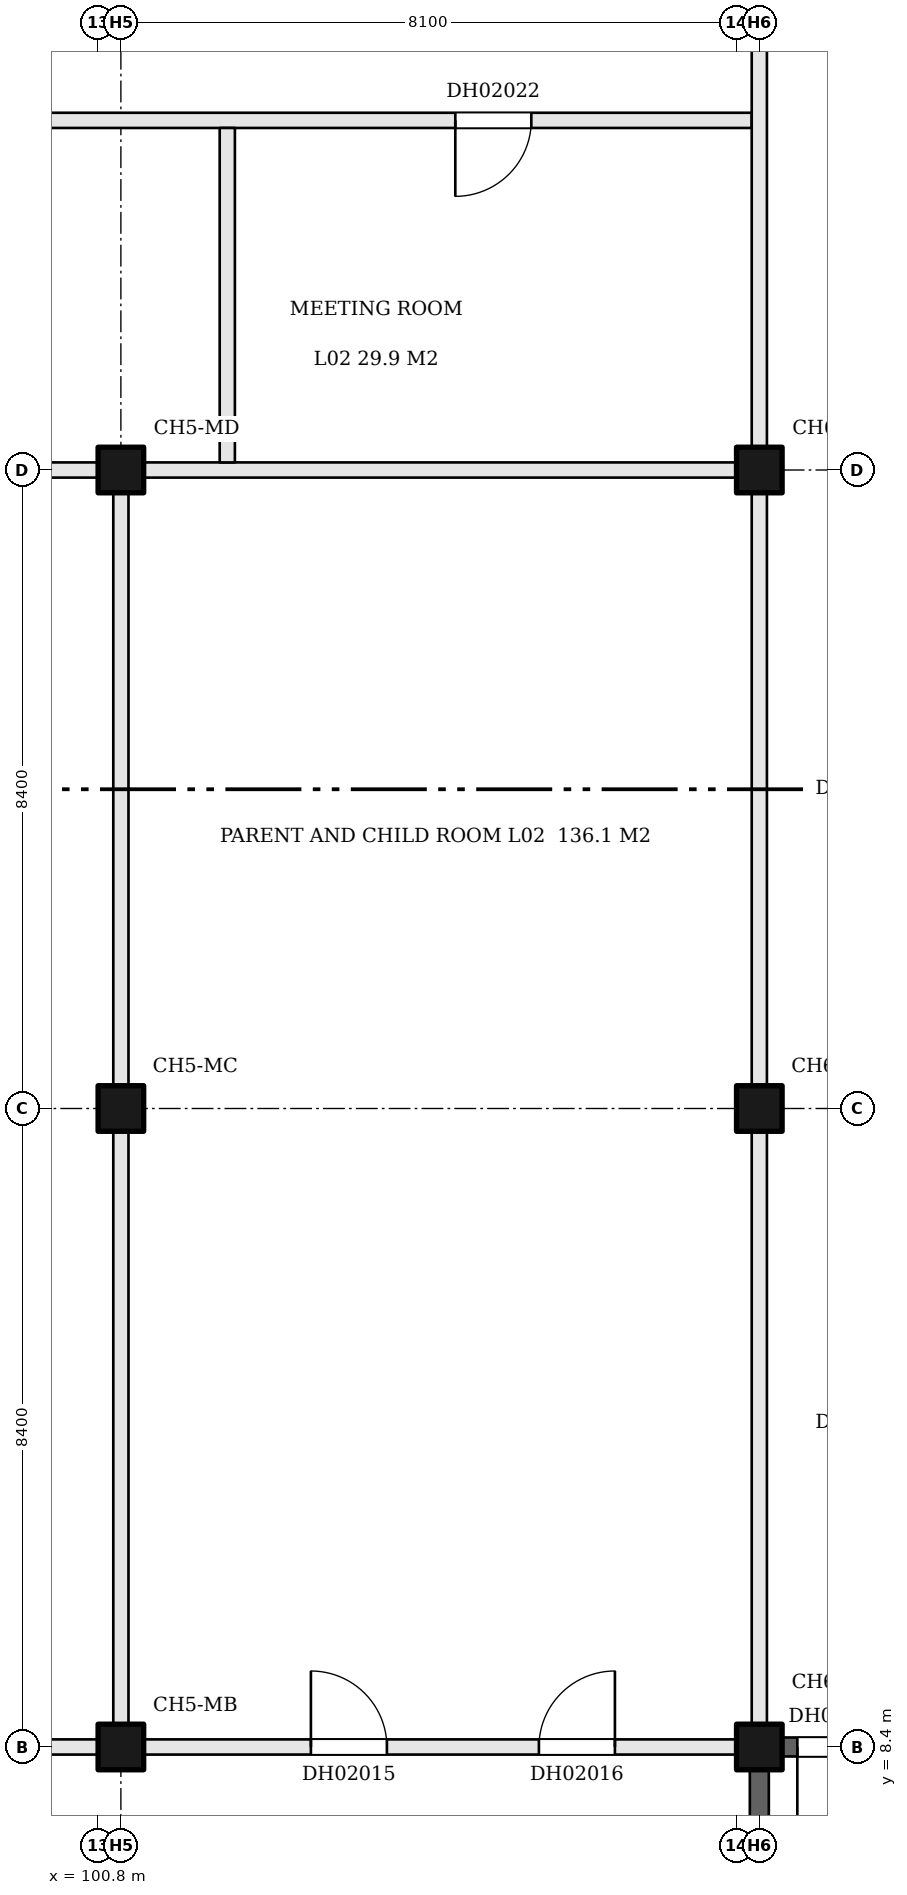
"""IFC4 building model, lengths in metres.
Left out: names, types, materials, properties, quantities, classifications, styles, units other than length and angle.
Written with IfcOpenShell. Run it as: python <this file> out.ifc"""

import sys

from ifc_helpers import new_model, si_unit, direction, frame, frame_2d, origin, origin_2d, place, context, subcontext, project, spatial, rectangle, extrude, element, fill, save


model = new_model("IFC4")
c1 = context("Model", 3, precision=1e-05, world=origin(), true_north=direction((0.0, 1.0)))
c2 = subcontext(c1, "Body", "Model", "MODEL_VIEW")
j1 = project(units=[si_unit("LENGTHUNIT", "METRE"), si_unit("PLANEANGLEUNIT", "RADIAN")], contexts=[c1])
p1 = place(None, origin())
s1 = spatial("IfcSite", under=j1, at=p1, CompositionType="ELEMENT")
p2 = place(p1, origin())
s2 = spatial("IfcBuilding", under=s1, at=p2, CompositionType="ELEMENT")
p3 = place(p2, frame((0.0, 0.0, 14.4)))
s3 = spatial("IfcBuildingStorey", under=s2, at=p3, CompositionType="ELEMENT", Elevation=14.4)
for number, where, z_axis, x_axis in (
    (1, (101.1, 8.4, 0.0), (0.0, 0.0, 1.0), (1.0, 0.0, 0.0)),
    (2, (101.1, 16.8, 0.0), (0.0, 0.0, 1.0), (1.0, 0.0, 0.0)),
    (3, (101.1, 25.2, 0.0), (0.0, 0.0, 1.0), (1.0, 0.0, 0.0)),
    (4, (109.5, 8.4, 0.0), (0.0, 0.0, 1.0), (1.0, 0.0, 0.0)),
    (5, (109.5, 16.8, 0.0), (0.0, 0.0, 1.0), (1.0, 0.0, 0.0)),
    (6, (109.5, 25.2, 0.0), (0.0, 0.0, 1.0), (1.0, 0.0, 0.0)),
):
    element("IfcColumn", number, at=place(p3, frame(where, z_axis=z_axis, x_axis=x_axis)), inside=s3, PredefinedType="COLUMN", context=c2, shape_type="SweptSolid", body=[
        extrude(rectangle(XDim=0.6, YDim=0.6, at=origin_2d()), origin(), (0.0, 0.0, 1.0), 5.1),
    ])
p4 = place(p3, frame((93.0, 8.4, 0.0), z_axis=(0.0, 0.0, 1.0), x_axis=(1.0, 0.0, 0.0)))
e7 = element("IfcWall", 7, at=p4, inside=s3, PredefinedType="PARTITIONING", context=c2, shape_type="SweptSolid", body=[
    extrude(rectangle(XDim=7.8, YDim=0.2, at=frame_2d((3.9, 0.0))), origin(), (0.0, 0.0, 1.0), 5.1),
])
p5 = place(p4, frame((2.2, 0.0, 0.0)))
e8 = element("IfcOpeningElement", 8, at=p5, cuts=e7, PredefinedType="OPENING", context=c2, shape_type="SweptSolid", body=[
    extrude(rectangle(XDim=1.0, YDim=2.1, at=frame_2d((0.5, 1.05))), frame((0.0, 0.11, 0.0), z_axis=(0.0, -1.0, 0.0), x_axis=(1.0, 0.0, 0.0)), (0.0, 0.0, 1.0), 0.22),
])
p6 = place(p4, frame((5.2, 0.0, 0.0)))
e9 = element("IfcOpeningElement", 9, at=p6, cuts=e7, PredefinedType="OPENING", context=c2, shape_type="SweptSolid", body=[
    extrude(rectangle(XDim=1.0, YDim=2.1, at=frame_2d((0.5, 1.05))), frame((0.0, 0.11, 0.0), z_axis=(0.0, -1.0, 0.0), x_axis=(1.0, 0.0, 0.0)), (0.0, 0.0, 1.0), 0.22),
])
p7 = place(p3, frame((101.4, 8.4, 0.0), z_axis=(0.0, 0.0, 1.0), x_axis=(1.0, 0.0, 0.0)))
e10 = element("IfcWall", 10, at=p7, inside=s3, PredefinedType="PARTITIONING", context=c2, shape_type="SweptSolid", body=[
    extrude(rectangle(XDim=7.8, YDim=0.2, at=frame_2d((3.9, 0.0))), origin(), (0.0, 0.0, 1.0), 5.1),
])
p8 = place(p7, frame((2.2, 0.0, 0.0)))
e11 = element("IfcOpeningElement", 11, at=p8, cuts=e10, PredefinedType="OPENING", context=c2, shape_type="SweptSolid", body=[
    extrude(rectangle(XDim=1.0, YDim=2.1, at=frame_2d((0.5, 1.05))), frame((0.0, 0.11, 0.0), z_axis=(0.0, -1.0, 0.0), x_axis=(1.0, 0.0, 0.0)), (0.0, 0.0, 1.0), 0.22),
])
p9 = place(p7, frame((5.2, 0.0, 0.0)))
e12 = element("IfcOpeningElement", 12, at=p9, cuts=e10, PredefinedType="OPENING", context=c2, shape_type="SweptSolid", body=[
    extrude(rectangle(XDim=1.0, YDim=2.1, at=frame_2d((0.5, 1.05))), frame((0.0, 0.11, 0.0), z_axis=(0.0, -1.0, 0.0), x_axis=(1.0, 0.0, 0.0)), (0.0, 0.0, 1.0), 0.22),
])
p10 = place(p3, frame((109.8, 8.4, 0.0), z_axis=(0.0, 0.0, 1.0), x_axis=(1.0, 0.0, 0.0)))
e13 = element("IfcWall", 13, at=p10, inside=s3, PredefinedType="SHEAR", context=c2, shape_type="SweptSolid", body=[
    extrude(rectangle(XDim=7.2, YDim=0.25, at=frame_2d((3.6, 0.0))), origin(), (0.0, 0.0, 1.0), 5.1),
])
p11 = place(p10, frame((0.2, 0.0, 0.0)))
e14 = element("IfcOpeningElement", 14, at=p11, cuts=e13, PredefinedType="OPENING", context=c2, shape_type="SweptSolid", body=[
    extrude(rectangle(XDim=1.0, YDim=2.1, at=frame_2d((0.5, 1.05))), frame((0.0, 0.135, 0.0), z_axis=(0.0, -1.0, 0.0), x_axis=(1.0, 0.0, 0.0)), (0.0, 0.0, 1.0), 0.27),
])
for number, where, z_axis, x_axis in (
    (15, (93.0, 25.2, 0.0), (0.0, 0.0, 1.0), (1.0, 0.0, 0.0)),
    (16, (101.4, 25.2, 0.0), (0.0, 0.0, 1.0), (1.0, 0.0, 0.0)),
):
    element("IfcWall", number, at=place(p3, frame(where, z_axis=z_axis, x_axis=x_axis)), inside=s3, PredefinedType="PARTITIONING", context=c2, shape_type="SweptSolid", body=[
        extrude(rectangle(XDim=7.8, YDim=0.2, at=frame_2d((3.9, 0.0))), origin(), (0.0, 0.0, 1.0), 5.1),
    ])
p12 = place(p3, frame((76.025, 29.8, 0.0), z_axis=(0.0, 0.0, 1.0), x_axis=(1.0, 0.0, 0.0)))
e17 = element("IfcWall", 17, at=p12, inside=s3, PredefinedType="PARTITIONING", context=c2, shape_type="SweptSolid", body=[
    extrude(rectangle(XDim=33.375, YDim=0.2, at=frame_2d((16.688, 0.0))), origin(), (0.0, 0.0, 1.0), 5.1),
])
p13 = place(p12, frame((1.538, 0.0, 0.0)))
e18 = element("IfcOpeningElement", 18, at=p13, cuts=e17, PredefinedType="OPENING", context=c2, shape_type="SweptSolid", body=[
    extrude(rectangle(XDim=1.0, YDim=2.1, at=frame_2d((0.5, 1.05))), frame((0.0, 0.11, 0.0), z_axis=(0.0, -1.0, 0.0), x_axis=(1.0, 0.0, 0.0)), (0.0, 0.0, 1.0), 0.22),
])
p14 = place(p12, frame((5.675, 0.0, 0.0)))
e19 = element("IfcOpeningElement", 19, at=p14, cuts=e17, PredefinedType="OPENING", context=c2, shape_type="SweptSolid", body=[
    extrude(rectangle(XDim=1.0, YDim=2.1, at=frame_2d((0.5, 1.05))), frame((0.0, 0.11, 0.0), z_axis=(0.0, -1.0, 0.0), x_axis=(1.0, 0.0, 0.0)), (0.0, 0.0, 1.0), 0.22),
])
p15 = place(p12, frame((9.175, 0.0, 0.0)))
e20 = element("IfcOpeningElement", 20, at=p15, cuts=e17, PredefinedType="OPENING", context=c2, shape_type="SweptSolid", body=[
    extrude(rectangle(XDim=1.0, YDim=2.1, at=frame_2d((0.5, 1.05))), frame((0.0, 0.11, 0.0), z_axis=(0.0, -1.0, 0.0), x_axis=(1.0, 0.0, 0.0)), (0.0, 0.0, 1.0), 0.22),
])
p16 = place(p12, frame((14.775, 0.0, 0.0)))
e21 = element("IfcOpeningElement", 21, at=p16, cuts=e17, PredefinedType="OPENING", context=c2, shape_type="SweptSolid", body=[
    extrude(rectangle(XDim=1.0, YDim=2.1, at=frame_2d((0.5, 1.05))), frame((0.0, 0.11, 0.0), z_axis=(0.0, -1.0, 0.0), x_axis=(1.0, 0.0, 0.0)), (0.0, 0.0, 1.0), 0.22),
])
p17 = place(p12, frame((22.475, 0.0, 0.0)))
e22 = element("IfcOpeningElement", 22, at=p17, cuts=e17, PredefinedType="OPENING", context=c2, shape_type="SweptSolid", body=[
    extrude(rectangle(XDim=1.0, YDim=2.1, at=frame_2d((0.5, 1.05))), frame((0.0, 0.11, 0.0), z_axis=(0.0, -1.0, 0.0), x_axis=(1.0, 0.0, 0.0)), (0.0, 0.0, 1.0), 0.22),
])
p18 = place(p12, frame((29.475, 0.0, 0.0)))
e23 = element("IfcOpeningElement", 23, at=p18, cuts=e17, PredefinedType="OPENING", context=c2, shape_type="SweptSolid", body=[
    extrude(rectangle(XDim=1.0, YDim=2.1, at=frame_2d((0.5, 1.05))), frame((0.0, 0.11, 0.0), z_axis=(0.0, -1.0, 0.0), x_axis=(1.0, 0.0, 0.0)), (0.0, 0.0, 1.0), 0.22),
])
p19 = place(p3, frame((101.1, 8.7, 0.0), z_axis=(0.0, 0.0, 1.0), x_axis=(0.0, 1.0, 0.0)))
e24 = element("IfcWall", 24, at=p19, inside=s3, PredefinedType="PARTITIONING", context=c2, shape_type="SweptSolid", body=[
    extrude(rectangle(XDim=7.8, YDim=0.2, at=frame_2d((3.9, 0.0))), origin(), (0.0, 0.0, 1.0), 5.1),
])
p20 = place(p3, frame((101.1, 17.1, 0.0), z_axis=(0.0, 0.0, 1.0), x_axis=(0.0, 1.0, 0.0)))
e25 = element("IfcWall", 25, at=p20, inside=s3, PredefinedType="PARTITIONING", context=c2, shape_type="SweptSolid", body=[
    extrude(rectangle(XDim=7.8, YDim=0.2, at=frame_2d((3.9, 0.0))), origin(), (0.0, 0.0, 1.0), 5.1),
])
p21 = place(p3, frame((102.5, 25.3, 0.0), z_axis=(0.0, 0.0, 1.0), x_axis=(0.0, 1.0, 0.0)))
e26 = element("IfcWall", 26, at=p21, inside=s3, PredefinedType="PARTITIONING", context=c2, shape_type="SweptSolid", body=[
    extrude(rectangle(XDim=4.4, YDim=0.2, at=frame_2d((2.2, 0.0))), origin(), (0.0, 0.0, 1.0), 5.1),
])
p22 = place(p3, frame((109.5, 0.9, 0.0), z_axis=(0.0, 0.0, 1.0), x_axis=(0.0, 1.0, 0.0)))
e27 = element("IfcWall", 27, at=p22, inside=s3, PredefinedType="SHEAR", context=c2, shape_type="SweptSolid", body=[
    extrude(rectangle(XDim=7.2, YDim=0.25, at=frame_2d((3.6, 0.0))), origin(), (0.0, 0.0, 1.0), 5.1),
])
p23 = place(p22, frame((4.3, 0.0, 0.0)))
e28 = element("IfcOpeningElement", 28, at=p23, cuts=e27, PredefinedType="OPENING", context=c2, shape_type="SweptSolid", body=[
    extrude(rectangle(XDim=1.4, YDim=2.1, at=frame_2d((0.7, 1.05))), frame((0.0, 0.135, 0.0), z_axis=(0.0, -1.0, 0.0), x_axis=(1.0, 0.0, 0.0)), (0.0, 0.0, 1.0), 0.27),
])
p24 = place(p3, frame((109.5, 8.7, 0.0), z_axis=(0.0, 0.0, 1.0), x_axis=(0.0, 1.0, 0.0)))
e29 = element("IfcWall", 29, at=p24, inside=s3, PredefinedType="PARTITIONING", context=c2, shape_type="SweptSolid", body=[
    extrude(rectangle(XDim=7.8, YDim=0.2, at=frame_2d((3.9, 0.0))), origin(), (0.0, 0.0, 1.0), 5.1),
])
p25 = place(p3, frame((109.5, 17.1, 0.0), z_axis=(0.0, 0.0, 1.0), x_axis=(0.0, 1.0, 0.0)))
e30 = element("IfcWall", 30, at=p25, inside=s3, PredefinedType="PARTITIONING", context=c2, shape_type="SweptSolid", body=[
    extrude(rectangle(XDim=7.8, YDim=0.2, at=frame_2d((3.9, 0.0))), origin(), (0.0, 0.0, 1.0), 5.1),
])
p26 = place(p3, frame((109.5, 25.5, 0.0), z_axis=(0.0, 0.0, 1.0), x_axis=(0.0, 1.0, 0.0)))
e31 = element("IfcWall", 31, at=p26, inside=s3, PredefinedType="PARTITIONING", context=c2, shape_type="SweptSolid", body=[
    extrude(rectangle(XDim=7.2, YDim=0.2, at=frame_2d((3.6, 0.0))), origin(), (0.0, 0.0, 1.0), 5.1),
])
p27 = place(p26, frame((5.5, 0.0, 0.0)))
e32 = element("IfcOpeningElement", 32, at=p27, cuts=e31, PredefinedType="OPENING", context=c2, shape_type="SweptSolid", body=[
    extrude(rectangle(XDim=1.4, YDim=2.1, at=frame_2d((0.7, 1.05))), frame((0.0, 0.11, 0.0), z_axis=(0.0, -1.0, 0.0), x_axis=(1.0, 0.0, 0.0)), (0.0, 0.0, 1.0), 0.22),
])
p28 = place(p8, origin())
e33 = element("IfcDoor", 33, at=p28, inside=s3, OperationType="SINGLE_SWING_LEFT", PredefinedType="DOOR", context=c2, shape_type="SweptSolid", body=[
    extrude(rectangle(XDim=1.0, YDim=2.1, at=frame_2d((0.5, 1.05))), frame((0.0, 0.025, 0.0), z_axis=(0.0, -1.0, 0.0), x_axis=(1.0, 0.0, 0.0)), (0.0, 0.0, 1.0), 0.05),
])
fill(e11, e33)
p29 = place(p9, origin())
e34 = element("IfcDoor", 34, at=p29, inside=s3, OperationType="SINGLE_SWING_RIGHT", PredefinedType="DOOR", context=c2, shape_type="SweptSolid", body=[
    extrude(rectangle(XDim=1.0, YDim=2.1, at=frame_2d((0.5, 1.05))), frame((0.0, 0.025, 0.0), z_axis=(0.0, -1.0, 0.0), x_axis=(1.0, 0.0, 0.0)), (0.0, 0.0, 1.0), 0.05),
])
fill(e12, e34)
p30 = place(p18, frame((1.0, 0.0, 0.0), z_axis=(0.0, 0.0, 1.0), x_axis=(-1.0, 0.0, 0.0)))
e35 = element("IfcDoor", 35, at=p30, inside=s3, OperationType="SINGLE_SWING_RIGHT", PredefinedType="DOOR", context=c2, shape_type="SweptSolid", body=[
    extrude(rectangle(XDim=1.0, YDim=2.1, at=frame_2d((0.5, 1.05))), frame((0.0, 0.025, 0.0), z_axis=(0.0, -1.0, 0.0), x_axis=(1.0, 0.0, 0.0)), (0.0, 0.0, 1.0), 0.05),
])
fill(e23, e35)
p31 = place(p11, frame((1.0, 0.0, 0.0), z_axis=(0.0, 0.0, 1.0), x_axis=(-1.0, 0.0, 0.0)))
e36 = element("IfcDoor", 36, at=p31, inside=s3, OperationType="SINGLE_SWING_RIGHT", PredefinedType="DOOR", context=c2, shape_type="SweptSolid", body=[
    extrude(rectangle(XDim=1.0, YDim=2.1, at=frame_2d((0.5, 1.05))), frame((0.0, 0.025, 0.0), z_axis=(0.0, -1.0, 0.0), x_axis=(1.0, 0.0, 0.0)), (0.0, 0.0, 1.0), 0.05),
])
fill(e14, e36)
save(model, sys.argv[1])
